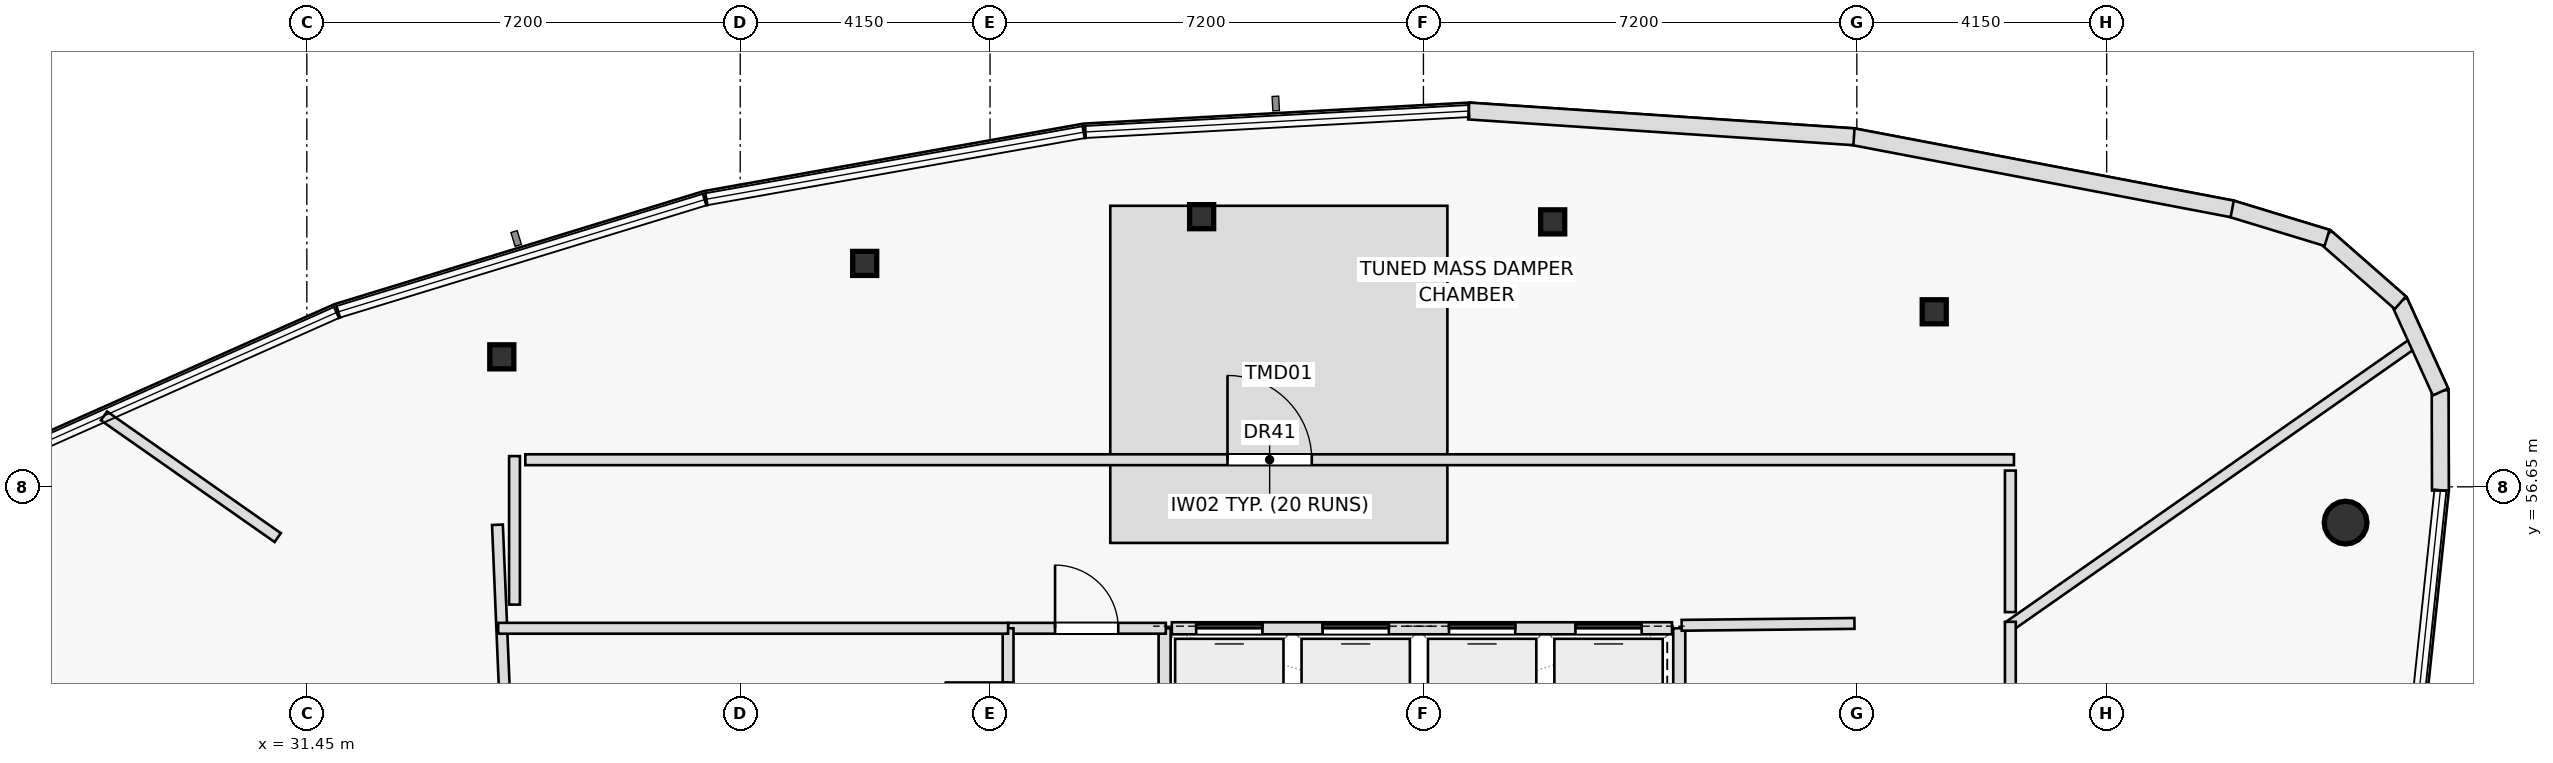
"""IFC4 building model, lengths in metres.
Left out: names, types, materials, properties, quantities, classifications, styles, units other than length and angle.
Written with IfcOpenShell. Run it as: python <this file> out.ifc"""

import sys

from ifc_helpers import new_model, si_unit, direction, frame, frame_2d, origin, origin_2d, place, context, subcontext, project, spatial, rectangle, hollow_rectangle, hollow_circle, extrude, element, fill, save


model = new_model("IFC4")
c1 = context("Model", 3, precision=1e-05, world=origin(), true_north=direction((0.0, 1.0)))
c2 = subcontext(c1, "Body", "Model", "MODEL_VIEW")
j1 = project(units=[si_unit("LENGTHUNIT", "METRE"), si_unit("PLANEANGLEUNIT", "RADIAN")], contexts=[c1])
p1 = place(None, origin())
s1 = spatial("IfcSite", under=j1, at=p1, CompositionType="ELEMENT")
p2 = place(p1, origin())
s2 = spatial("IfcBuilding", under=s1, at=p2, CompositionType="ELEMENT")
p3 = place(p2, frame((0.0, 0.0, 325.5)))
s3 = spatial("IfcBuildingStorey", under=s2, at=p3, CompositionType="ELEMENT", Elevation=325.5)
p4 = place(p3, frame((65.32, 56.056, 0.0), z_axis=(0.0, 0.0, 1.0), x_axis=(1.0, 0.0, 0.0)))
e1 = element("IfcColumn", 1, at=p4, inside=s3, PredefinedType="COLUMN", context=c2, shape_type="SweptSolid", body=[
    extrude(hollow_circle(Radius=0.355, WallThickness=0.032, at=origin_2d()), origin(), (0.0, 0.0, 1.0), 6.25),
])
for number, where, z_axis, x_axis in (
    (2, (58.486, 59.557, 0.0), (0.0, 0.0, 1.0), (1.0, 0.0, 0.0)),
    (3, (52.147, 61.051, 0.0), (0.0, 0.0, 1.0), (1.0, 0.0, 0.0)),
    (4, (46.315, 61.137, 0.0), (0.0, 0.0, 1.0), (1.0, 0.0, 0.0)),
    (5, (40.718, 60.361, 0.0), (0.0, 0.0, 1.0), (1.0, 0.0, 0.0)),
    (6, (34.689, 58.809, 0.0), (0.0, 0.0, 1.0), (1.0, 0.0, 0.0)),
):
    element("IfcColumn", number, at=place(p3, frame(where, z_axis=z_axis, x_axis=x_axis)), inside=s3, PredefinedType="COLUMN", context=c2, shape_type="SweptSolid", body=[
        extrude(hollow_rectangle(XDim=0.4, YDim=0.4, WallThickness=0.025, at=origin_2d()), origin(), (0.0, 0.0, 1.0), 6.25),
    ])
for number, where, z_axis, x_axis in (
    (7, (45.7, 51.7, 0.0), (0.0, 0.0, 1.0), (0.0, 1.0, 0.0)),
    (8, (54.25, 51.7, 0.0), (0.0, 0.0, 1.0), (0.0, 1.0, 0.0)),
):
    element("IfcWall", number, at=place(p3, frame(where, z_axis=z_axis, x_axis=x_axis)), inside=s3, PredefinedType="PARTITIONING", context=c2, shape_type="SweptSolid", body=[
        extrude(rectangle(XDim=2.6, YDim=0.2, at=frame_2d((1.3, 0.0))), origin(), (0.0, 0.0, 1.0), 6.25),
    ])
p5 = place(p3, frame((34.617, 56.02, 0.0), z_axis=(0.0, 0.0, 1.0), x_axis=(0.041900659134, -0.999121781748, 0.0)))
e9 = element("IfcWall", 9, at=p5, inside=s3, PredefinedType="PARTITIONING", context=c2, shape_type="SweptSolid", body=[
    extrude(rectangle(XDim=4.323, YDim=0.18, at=frame_2d((2.162, 0.0))), origin(), (0.0, 0.0, 1.0), 3.725),
])
p6 = place(p3, frame((43.1, 54.3, 0.0), z_axis=(0.0, 0.0, 1.0), x_axis=(1.0, 0.0, 0.0)))
e10 = element("IfcWall", 10, at=p6, inside=s3, PredefinedType="PARTITIONING", context=c2, shape_type="SweptSolid", body=[
    extrude(rectangle(XDim=2.62, YDim=0.18, at=frame_2d((1.31, 0.0))), origin(), (0.0, 0.0, 1.0), 4.625),
])
p7 = place(p6, frame((0.78, 0.0, 0.0)))
e11 = element("IfcOpeningElement", 11, at=p7, cuts=e10, PredefinedType="OPENING", context=c2, shape_type="SweptSolid", body=[
    extrude(rectangle(XDim=1.05, YDim=2.2, at=frame_2d((0.525, 1.1))), frame((0.0, 0.1, 0.0), z_axis=(0.0, -1.0, 0.0), x_axis=(1.0, 0.0, 0.0)), (0.0, 0.0, 1.0), 0.2),
])
p8 = place(p3, frame((43.1, 51.7, 0.0), z_axis=(0.0, 0.0, 1.0), x_axis=(0.0, 1.0, 0.0)))
e12 = element("IfcWall", 12, at=p8, inside=s3, PredefinedType="PARTITIONING", context=c2, shape_type="SweptSolid", body=[
    extrude(rectangle(XDim=2.6, YDim=0.18, at=frame_2d((1.3, 0.0))), origin(), (0.0, 0.0, 1.0), 4.625),
])
p9 = place(p8, frame((0.65, 0.0, 0.0)))
e13 = element("IfcOpeningElement", 13, at=p9, cuts=e12, PredefinedType="OPENING", context=c2, shape_type="SweptSolid", body=[
    extrude(rectangle(XDim=1.05, YDim=2.2, at=frame_2d((0.525, 1.1))), frame((0.0, 0.1, 0.0), z_axis=(0.0, -1.0, 0.0), x_axis=(1.0, 0.0, 0.0)), (0.0, 0.0, 1.0), 0.2),
])
p10 = place(p3, frame((34.629, 54.3, 0.0), z_axis=(0.0, 0.0, 1.0), x_axis=(1.0, 0.0, 0.0)))
e14 = element("IfcWall", 14, at=p10, inside=s3, PredefinedType="PARTITIONING", context=c2, shape_type="SweptSolid", body=[
    extrude(rectangle(XDim=8.471, YDim=0.18, at=frame_2d((4.236, 0.0))), origin(), (0.0, 0.0, 1.0), 3.725),
])
p11 = place(p3, frame((59.75, 54.348, 0.0), z_axis=(0.0, 0.0, 1.0), x_axis=(0.819158229677, 0.573567602601, 0.0)))
e15 = element("IfcWall", 15, at=p11, inside=s3, PredefinedType="PARTITIONING", context=c2, shape_type="SweptSolid", body=[
    extrude(rectangle(XDim=8.25, YDim=0.18, at=frame_2d((4.125, 0.0))), origin(), (0.0, 0.0, 1.0), 3.725),
])
p12 = place(p3, frame((30.967, 55.807, 0.0), z_axis=(0.0, 0.0, 1.0), x_axis=(-0.819157035825, 0.573569307633, 0.0)))
e16 = element("IfcWall", 16, at=p12, inside=s3, PredefinedType="PARTITIONING", context=c2, shape_type="SweptSolid", body=[
    extrude(rectangle(XDim=3.523, YDim=0.18, at=frame_2d((1.762, 0.0))), origin(), (0.0, 0.0, 1.0), 6.25),
])
p13 = place(p3, frame((54.29, 54.349, 0.0), z_axis=(0.0, 0.0, 1.0), x_axis=(0.999940720292, 0.010888337916, 0.0)))
e17 = element("IfcWall", 17, at=p13, inside=s3, PredefinedType="PARTITIONING", context=c2, shape_type="SweptSolid", body=[
    extrude(rectangle(XDim=2.87, YDim=0.18, at=frame_2d((1.435, 0.0))), origin(), (0.0, 0.0, 1.0), 4.625),
])
p14 = place(p3, frame((34.9, 54.693, 0.0), z_axis=(0.0, 0.0, 1.0), x_axis=(0.0, 1.0, 0.0)))
e18 = element("IfcWall", 18, at=p14, inside=s3, PredefinedType="PARTITIONING", context=c2, shape_type="SweptSolid", body=[
    extrude(rectangle(XDim=2.467, YDim=0.18, at=frame_2d((1.233, 0.0))), origin(), (0.0, 0.0, 1.0), 4.625),
])
p15 = place(p3, frame((35.08, 57.1, 0.0), z_axis=(0.0, 0.0, 1.0), x_axis=(1.0, 0.0, 0.0)))
e19 = element("IfcWall", 19, at=p15, inside=s3, PredefinedType="PARTITIONING", context=c2, shape_type="SweptSolid", body=[
    extrude(rectangle(XDim=24.73, YDim=0.18, at=frame_2d((12.365, 0.0))), origin(), (0.0, 0.0, 1.0), 4.625),
])
p16 = place(p15, frame((11.665, 0.0, 0.0)))
e20 = element("IfcOpeningElement", 20, at=p16, cuts=e19, PredefinedType="OPENING", context=c2, shape_type="SweptSolid", body=[
    extrude(rectangle(XDim=1.4, YDim=2.15, at=frame_2d((0.7, 1.075))), frame((0.0, 0.1, 0.0), z_axis=(0.0, -1.0, 0.0), x_axis=(1.0, 0.0, 0.0)), (0.0, 0.0, 1.0), 0.2),
])
p17 = place(p3, frame((59.75, 56.92, 0.0), z_axis=(0.0, 0.0, 1.0), x_axis=(0.0, -1.0, 0.0)))
e21 = element("IfcWall", 21, at=p17, inside=s3, PredefinedType="PARTITIONING", context=c2, shape_type="SweptSolid", body=[
    extrude(rectangle(XDim=2.351, YDim=0.18, at=frame_2d((1.176, 0.0))), origin(), (0.0, 0.0, 1.0), 6.25),
])
p18 = place(p3, frame((59.75, 54.408, 0.0), z_axis=(0.0, 0.0, 1.0), x_axis=(0.0, -1.0, 0.0)))
e22 = element("IfcWall", 22, at=p18, inside=s3, PredefinedType="PARTITIONING", context=c2, shape_type="SweptSolid", body=[
    extrude(rectangle(XDim=21.723, YDim=0.18, at=frame_2d((10.861, 0.0))), origin(), (0.0, 0.0, 1.0), 4.625),
])
p19 = place(p18, frame((10.161, 0.0, 0.0)))
e23 = element("IfcOpeningElement", 23, at=p19, cuts=e22, PredefinedType="OPENING", context=c2, shape_type="SweptSolid", body=[
    extrude(rectangle(XDim=1.4, YDim=2.15, at=frame_2d((0.7, 1.075))), frame((0.0, 0.1, 0.0), z_axis=(0.0, -1.0, 0.0), x_axis=(1.0, 0.0, 0.0)), (0.0, 0.0, 1.0), 0.2),
])
p20 = place(p3, frame((66.895, 56.588, 0.0), z_axis=(0.0, 0.0, 1.0), x_axis=(-0.002637739944, 0.999996521158, 0.0)))
e24 = element("IfcWall", 24, at=p20, inside=s3, PredefinedType="STANDARD", context=c2, shape_type="SweptSolid", body=[
    extrude(rectangle(XDim=1.666, YDim=0.28, at=frame_2d((0.833, 0.0))), origin(), (0.0, 0.0, 1.0), 6.25),
])
p21 = place(p3, frame((66.896, 58.226, 0.0), z_axis=(0.0, 0.0, 1.0), x_axis=(-0.413914118792, 0.910315935412, 0.0)))
e25 = element("IfcWall", 25, at=p21, inside=s3, PredefinedType="STANDARD", context=c2, shape_type="SweptSolid", body=[
    extrude(rectangle(XDim=1.655, YDim=0.28, at=frame_2d((0.827, 0.0))), origin(), (0.0, 0.0, 1.0), 6.25),
])
p22 = place(p3, frame((66.229, 59.708, 0.0), z_axis=(0.0, 0.0, 1.0), x_axis=(-0.751716758053, 0.659486099674, 0.0)))
e26 = element("IfcWall", 26, at=p22, inside=s3, PredefinedType="STANDARD", context=c2, shape_type="SweptSolid", body=[
    extrude(rectangle(XDim=1.654, YDim=0.28, at=frame_2d((0.827, 0.0))), origin(), (0.0, 0.0, 1.0), 6.25),
])
p23 = place(p3, frame((65.011, 60.785, 0.0), z_axis=(0.0, 0.0, 1.0), x_axis=(-0.956546855659, 0.291578656504, 0.0)))
e27 = element("IfcWall", 27, at=p23, inside=s3, PredefinedType="STANDARD", context=c2, shape_type="SweptSolid", body=[
    extrude(rectangle(XDim=1.677, YDim=0.28, at=frame_2d((0.839, 0.0))), origin(), (0.0, 0.0, 1.0), 6.25),
])
p24 = place(p3, frame((63.436, 61.267, 0.0), z_axis=(0.0, 0.0, 1.0), x_axis=(-0.982368813291, 0.186953241945, 0.0)))
e28 = element("IfcWall", 28, at=p24, inside=s3, PredefinedType="STANDARD", context=c2, shape_type="SweptSolid", body=[
    extrude(rectangle(XDim=6.426, YDim=0.28, at=frame_2d((3.213, 0.0))), origin(), (0.0, 0.0, 1.0), 6.25),
])
p25 = place(p3, frame((57.152, 62.464, 0.0), z_axis=(0.0, 0.0, 1.0), x_axis=(-0.997774197542, 0.066683211676, 0.0)))
e29 = element("IfcWall", 29, at=p25, inside=s3, PredefinedType="STANDARD", context=c2, shape_type="SweptSolid", body=[
    extrude(rectangle(XDim=6.414, YDim=0.28, at=frame_2d((3.207, 0.0))), origin(), (0.0, 0.0, 1.0), 6.25),
])
p26 = place(p3, frame((45.82, 54.3, 0.0), z_axis=(0.0, 0.0, 1.0), x_axis=(1.0, 0.0, 0.0)))
e30 = element("IfcWall", 30, at=p26, inside=s3, PredefinedType="PARTITIONING", context=c2, shape_type="SweptSolid", body=[
    extrude(rectangle(XDim=8.31, YDim=0.2, at=frame_2d((4.155, 0.0))), origin(), (0.0, 0.0, 1.0), 6.25),
])
p27 = place(p26, frame((0.405, 0.0, 0.0)))
e31 = element("IfcOpeningElement", 31, at=p27, cuts=e30, PredefinedType="OPENING", context=c2, shape_type="SweptSolid", body=[
    extrude(rectangle(XDim=1.1, YDim=2.15, at=frame_2d((0.55, 1.075))), frame((0.0, 0.11, 0.0), z_axis=(0.0, -1.0, 0.0), x_axis=(1.0, 0.0, 0.0)), (0.0, 0.0, 1.0), 0.22),
])
p28 = place(p26, frame((2.505, 0.0, 0.0)))
e32 = element("IfcOpeningElement", 32, at=p28, cuts=e30, PredefinedType="OPENING", context=c2, shape_type="SweptSolid", body=[
    extrude(rectangle(XDim=1.1, YDim=2.15, at=frame_2d((0.55, 1.075))), frame((0.0, 0.11, 0.0), z_axis=(0.0, -1.0, 0.0), x_axis=(1.0, 0.0, 0.0)), (0.0, 0.0, 1.0), 0.22),
])
p29 = place(p26, frame((4.605, 0.0, 0.0)))
e33 = element("IfcOpeningElement", 33, at=p29, cuts=e30, PredefinedType="OPENING", context=c2, shape_type="SweptSolid", body=[
    extrude(rectangle(XDim=1.1, YDim=2.15, at=frame_2d((0.55, 1.075))), frame((0.0, 0.11, 0.0), z_axis=(0.0, -1.0, 0.0), x_axis=(1.0, 0.0, 0.0)), (0.0, 0.0, 1.0), 0.22),
])
p30 = place(p26, frame((6.705, 0.0, 0.0)))
e34 = element("IfcOpeningElement", 34, at=p30, cuts=e30, PredefinedType="OPENING", context=c2, shape_type="SweptSolid", body=[
    extrude(rectangle(XDim=1.1, YDim=2.15, at=frame_2d((0.55, 1.075))), frame((0.0, 0.11, 0.0), z_axis=(0.0, -1.0, 0.0), x_axis=(1.0, 0.0, 0.0)), (0.0, 0.0, 1.0), 0.22),
])
p31 = place(p7, origin())
e35 = element("IfcDoor", 35, at=p31, inside=s3, OperationType="SINGLE_SWING_LEFT", PredefinedType="DOOR", context=c2, shape_type="SweptSolid", body=[
    extrude(rectangle(XDim=1.05, YDim=2.2, at=frame_2d((0.525, 1.1))), frame((0.0, 0.025, 0.0), z_axis=(0.0, -1.0, 0.0), x_axis=(1.0, 0.0, 0.0)), (0.0, 0.0, 1.0), 0.05),
])
fill(e11, e35)
p32 = place(p9, origin())
e36 = element("IfcDoor", 36, at=p32, inside=s3, OperationType="SINGLE_SWING_RIGHT", PredefinedType="DOOR", context=c2, shape_type="SweptSolid", body=[
    extrude(rectangle(XDim=1.05, YDim=2.2, at=frame_2d((0.525, 1.1))), frame((0.0, 0.025, 0.0), z_axis=(0.0, -1.0, 0.0), x_axis=(1.0, 0.0, 0.0)), (0.0, 0.0, 1.0), 0.05),
])
fill(e13, e36)
p33 = place(p16, origin())
e37 = element("IfcDoor", 37, at=p33, inside=s3, OperationType="SINGLE_SWING_LEFT", PredefinedType="DOOR", context=c2, shape_type="SweptSolid", body=[
    extrude(rectangle(XDim=1.4, YDim=2.15, at=frame_2d((0.7, 1.075))), frame((0.0, 0.025, 0.0), z_axis=(0.0, -1.0, 0.0), x_axis=(1.0, 0.0, 0.0)), (0.0, 0.0, 1.0), 0.05),
])
fill(e20, e37)
p34 = place(p27, origin())
e38 = element("IfcDoor", 38, at=p34, inside=s3, OperationType="SLIDING_TO_LEFT", PredefinedType="DOOR", context=c2, shape_type="SweptSolid", body=[
    extrude(rectangle(XDim=1.1, YDim=2.15, at=frame_2d((0.55, 1.075))), frame((0.0, 0.025, 0.0), z_axis=(0.0, -1.0, 0.0), x_axis=(1.0, 0.0, 0.0)), (0.0, 0.0, 1.0), 0.05),
])
fill(e31, e38)
p35 = place(p28, origin())
e39 = element("IfcDoor", 39, at=p35, inside=s3, OperationType="SLIDING_TO_RIGHT", PredefinedType="DOOR", context=c2, shape_type="SweptSolid", body=[
    extrude(rectangle(XDim=1.1, YDim=2.15, at=frame_2d((0.55, 1.075))), frame((0.0, 0.025, 0.0), z_axis=(0.0, -1.0, 0.0), x_axis=(1.0, 0.0, 0.0)), (0.0, 0.0, 1.0), 0.05),
])
fill(e32, e39)
p36 = place(p29, origin())
e40 = element("IfcDoor", 40, at=p36, inside=s3, OperationType="SLIDING_TO_LEFT", PredefinedType="DOOR", context=c2, shape_type="SweptSolid", body=[
    extrude(rectangle(XDim=1.1, YDim=2.15, at=frame_2d((0.55, 1.075))), frame((0.0, 0.025, 0.0), z_axis=(0.0, -1.0, 0.0), x_axis=(1.0, 0.0, 0.0)), (0.0, 0.0, 1.0), 0.05),
])
fill(e33, e40)
p37 = place(p30, origin())
e41 = element("IfcDoor", 41, at=p37, inside=s3, OperationType="SLIDING_TO_RIGHT", PredefinedType="DOOR", context=c2, shape_type="SweptSolid", body=[
    extrude(rectangle(XDim=1.1, YDim=2.15, at=frame_2d((0.55, 1.075))), frame((0.0, 0.025, 0.0), z_axis=(0.0, -1.0, 0.0), x_axis=(1.0, 0.0, 0.0)), (0.0, 0.0, 1.0), 0.05),
])
fill(e34, e41)
save(model, sys.argv[1])
